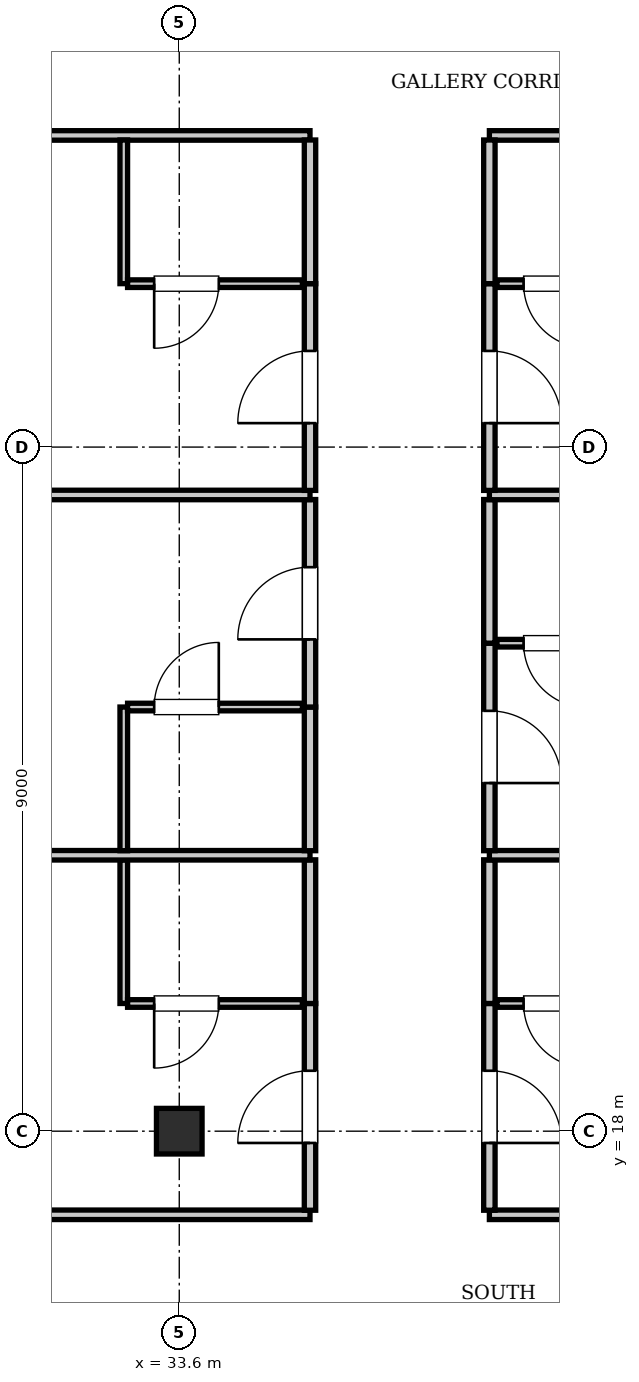
"""IFC4 building model, lengths in metres.
Left out: names, types, materials, properties, quantities, classifications, styles, units other than length and angle.
Written with IfcOpenShell. Run it as: python <this file> out.ifc"""

import sys

from ifc_helpers import new_model, si_unit, direction, frame, frame_2d, origin, origin_2d, place, context, subcontext, project, spatial, rectangle, i_section, extrude, element, fill, save


model = new_model("IFC4")
c1 = context("Model", 3, precision=1e-05, world=origin(), true_north=direction((0.0, 1.0)))
c2 = subcontext(c1, "Body", "Model", "MODEL_VIEW")
j1 = project(units=[si_unit("LENGTHUNIT", "METRE"), si_unit("PLANEANGLEUNIT", "RADIAN")], contexts=[c1])
p1 = place(None, origin())
s1 = spatial("IfcSite", under=j1, at=p1, CompositionType="ELEMENT")
p2 = place(p1, origin())
s2 = spatial("IfcBuilding", under=s1, at=p2, CompositionType="ELEMENT")
p3 = place(p2, frame((0.0, 0.0, 142.8)))
s3 = spatial("IfcBuildingStorey", under=s2, at=p3, CompositionType="ELEMENT", Elevation=142.8)
p4 = place(p3, frame((33.6, 18.0, 0.0), z_axis=(0.0, 0.0, 1.0), x_axis=(1.0, 0.0, 0.0)))
e1 = element("IfcColumn", 1, at=p4, inside=s3, PredefinedType="COLUMN", context=c2, shape_type="SweptSolid", body=[
    extrude(i_section(OverallWidth=0.6, OverallDepth=0.6, WebThickness=0.025, FlangeThickness=0.038, at=origin_2d()), origin(), (0.0, 0.0, 1.0), 3.85),
])
p5 = place(p3, frame((13.2, 16.9, 0.0), z_axis=(0.0, 0.0, 1.0), x_axis=(1.0, 0.0, 0.0)))
e2 = element("IfcWall", 2, at=p5, inside=s3, PredefinedType="PARTITIONING", context=c2, shape_type="SweptSolid", body=[
    extrude(rectangle(XDim=22.12, YDim=0.125, at=frame_2d((11.06, 0.0))), origin(), (0.0, 0.0, 1.0), 3.61),
])
p6 = place(p3, frame((37.68, 16.9, 0.0), z_axis=(0.0, 0.0, 1.0), x_axis=(1.0, 0.0, 0.0)))
e3 = element("IfcWall", 3, at=p6, inside=s3, PredefinedType="PARTITIONING", context=c2, shape_type="SweptSolid", body=[
    extrude(rectangle(XDim=24.72, YDim=0.125, at=frame_2d((12.36, 0.0))), origin(), (0.0, 0.0, 1.0), 3.61),
])
p7 = place(p3, frame((13.2, 31.1, 0.0), z_axis=(0.0, 0.0, 1.0), x_axis=(1.0, 0.0, 0.0)))
e4 = element("IfcWall", 4, at=p7, inside=s3, PredefinedType="PARTITIONING", context=c2, shape_type="SweptSolid", body=[
    extrude(rectangle(XDim=22.12, YDim=0.125, at=frame_2d((11.06, 0.0))), origin(), (0.0, 0.0, 1.0), 3.61),
])
p8 = place(p3, frame((37.68, 31.1, 0.0), z_axis=(0.0, 0.0, 1.0), x_axis=(1.0, 0.0, 0.0)))
e5 = element("IfcWall", 5, at=p8, inside=s3, PredefinedType="PARTITIONING", context=c2, shape_type="SweptSolid", body=[
    extrude(rectangle(XDim=24.72, YDim=0.125, at=frame_2d((12.36, 0.0))), origin(), (0.0, 0.0, 1.0), 3.61),
])
p9 = place(p3, frame((35.32, 16.96, 0.0), z_axis=(0.0, 0.0, 1.0), x_axis=(0.0, 1.0, 0.0)))
e6 = element("IfcWall", 6, at=p9, inside=s3, PredefinedType="PARTITIONING", context=c2, shape_type="SweptSolid", body=[
    extrude(rectangle(XDim=2.72, YDim=0.15, at=frame_2d((1.36, 0.0))), origin(), (0.0, 0.0, 1.0), 3.61),
])
p10 = place(p9, frame((0.885, 0.0, 0.0)))
e7 = element("IfcOpeningElement", 7, at=p10, cuts=e6, PredefinedType="OPENING", context=c2, shape_type="SweptSolid", body=[
    extrude(rectangle(XDim=0.95, YDim=2.15, at=frame_2d((0.475, 1.075))), frame((0.0, 0.085, 0.0), z_axis=(0.0, -1.0, 0.0), x_axis=(1.0, 0.0, 0.0)), (0.0, 0.0, 1.0), 0.17),
])
p11 = place(p3, frame((35.32, 19.68, 0.0), z_axis=(0.0, 0.0, 1.0), x_axis=(0.0, 1.0, 0.0)))
e8 = element("IfcWall", 8, at=p11, inside=s3, PredefinedType="PARTITIONING", context=c2, shape_type="SweptSolid", body=[
    extrude(rectangle(XDim=1.89, YDim=0.15, at=frame_2d((0.945, 0.0))), origin(), (0.0, 0.0, 1.0), 3.61),
])
p12 = place(p3, frame((32.87, 19.68, 0.0), z_axis=(0.0, 0.0, 1.0), x_axis=(0.0, 1.0, 0.0)))
e9 = element("IfcWall", 9, at=p12, inside=s3, PredefinedType="PARTITIONING", context=c2, shape_type="SweptSolid", body=[
    extrude(rectangle(XDim=1.89, YDim=0.1, at=frame_2d((0.945, 0.0))), origin(), (0.0, 0.0, 1.0), 3.61),
])
p13 = place(p3, frame((32.92, 19.68, 0.0), z_axis=(0.0, 0.0, 1.0), x_axis=(1.0, 0.0, 0.0)))
e10 = element("IfcWall", 10, at=p13, inside=s3, PredefinedType="PARTITIONING", context=c2, shape_type="SweptSolid", body=[
    extrude(rectangle(XDim=2.3, YDim=0.1, at=frame_2d((1.15, 0.0))), origin(), (0.0, 0.0, 1.0), 3.61),
])
p14 = place(p13, frame((0.35, 0.0, 0.0)))
e11 = element("IfcOpeningElement", 11, at=p14, cuts=e10, PredefinedType="OPENING", context=c2, shape_type="SweptSolid", body=[
    extrude(rectangle(XDim=0.85, YDim=2.1, at=frame_2d((0.425, 1.05))), frame((0.0, 0.06, 0.0), z_axis=(0.0, -1.0, 0.0), x_axis=(1.0, 0.0, 0.0)), (0.0, 0.0, 1.0), 0.12),
])
p15 = place(p3, frame((37.68, 16.96, 0.0), z_axis=(0.0, 0.0, 1.0), x_axis=(0.0, 1.0, 0.0)))
e12 = element("IfcWall", 12, at=p15, inside=s3, PredefinedType="PARTITIONING", context=c2, shape_type="SweptSolid", body=[
    extrude(rectangle(XDim=2.72, YDim=0.15, at=frame_2d((1.36, 0.0))), origin(), (0.0, 0.0, 1.0), 3.304),
])
p16 = place(p15, frame((0.885, 0.0, 0.0)))
e13 = element("IfcOpeningElement", 13, at=p16, cuts=e12, PredefinedType="OPENING", context=c2, shape_type="SweptSolid", body=[
    extrude(rectangle(XDim=0.95, YDim=2.15, at=frame_2d((0.475, 1.075))), frame((0.0, 0.085, 0.0), z_axis=(0.0, -1.0, 0.0), x_axis=(1.0, 0.0, 0.0)), (0.0, 0.0, 1.0), 0.17),
])
p17 = place(p3, frame((37.68, 19.68, 0.0), z_axis=(0.0, 0.0, 1.0), x_axis=(0.0, 1.0, 0.0)))
e14 = element("IfcWall", 14, at=p17, inside=s3, PredefinedType="PARTITIONING", context=c2, shape_type="SweptSolid", body=[
    extrude(rectangle(XDim=1.89, YDim=0.15, at=frame_2d((0.945, 0.0))), origin(), (0.0, 0.0, 1.0), 3.61),
])
p18 = place(p3, frame((37.78, 19.68, 0.0), z_axis=(0.0, 0.0, 1.0), x_axis=(1.0, 0.0, 0.0)))
e15 = element("IfcWall", 15, at=p18, inside=s3, PredefinedType="PARTITIONING", context=c2, shape_type="SweptSolid", body=[
    extrude(rectangle(XDim=2.3, YDim=0.1, at=frame_2d((1.15, 0.0))), origin(), (0.0, 0.0, 1.0), 3.61),
])
p19 = place(p18, frame((0.35, 0.0, 0.0)))
e16 = element("IfcOpeningElement", 16, at=p19, cuts=e15, PredefinedType="OPENING", context=c2, shape_type="SweptSolid", body=[
    extrude(rectangle(XDim=0.85, YDim=2.1, at=frame_2d((0.425, 1.05))), frame((0.0, 0.06, 0.0), z_axis=(0.0, -1.0, 0.0), x_axis=(1.0, 0.0, 0.0)), (0.0, 0.0, 1.0), 0.12),
])
p20 = place(p3, frame((13.2, 21.63, 0.0), z_axis=(0.0, 0.0, 1.0), x_axis=(1.0, 0.0, 0.0)))
e17 = element("IfcWall", 17, at=p20, inside=s3, PredefinedType="PARTITIONING", context=c2, shape_type="SweptSolid", body=[
    extrude(rectangle(XDim=22.12, YDim=0.125, at=frame_2d((11.06, 0.0))), origin(), (0.0, 0.0, 1.0), 3.61),
])
p21 = place(p3, frame((37.68, 21.63, 0.0), z_axis=(0.0, 0.0, 1.0), x_axis=(1.0, 0.0, 0.0)))
e18 = element("IfcWall", 18, at=p21, inside=s3, PredefinedType="PARTITIONING", context=c2, shape_type="SweptSolid", body=[
    extrude(rectangle(XDim=24.72, YDim=0.125, at=frame_2d((12.36, 0.0))), origin(), (0.0, 0.0, 1.0), 3.61),
])
p22 = place(p3, frame((35.32, 21.69, 0.0), z_axis=(0.0, 0.0, 1.0), x_axis=(0.0, 1.0, 0.0)))
e19 = element("IfcWall", 19, at=p22, inside=s3, PredefinedType="PARTITIONING", context=c2, shape_type="SweptSolid", body=[
    extrude(rectangle(XDim=1.89, YDim=0.15, at=frame_2d((0.945, 0.0))), origin(), (0.0, 0.0, 1.0), 3.61),
])
p23 = place(p3, frame((35.32, 23.58, 0.0), z_axis=(0.0, 0.0, 1.0), x_axis=(0.0, 1.0, 0.0)))
e20 = element("IfcWall", 20, at=p23, inside=s3, PredefinedType="PARTITIONING", context=c2, shape_type="SweptSolid", body=[
    extrude(rectangle(XDim=2.73, YDim=0.15, at=frame_2d((1.365, 0.0))), origin(), (0.0, 0.0, 1.0), 3.61),
])
p24 = place(p23, frame((0.89, 0.0, 0.0)))
e21 = element("IfcOpeningElement", 21, at=p24, cuts=e20, PredefinedType="OPENING", context=c2, shape_type="SweptSolid", body=[
    extrude(rectangle(XDim=0.95, YDim=2.15, at=frame_2d((0.475, 1.075))), frame((0.0, 0.085, 0.0), z_axis=(0.0, -1.0, 0.0), x_axis=(1.0, 0.0, 0.0)), (0.0, 0.0, 1.0), 0.17),
])
p25 = place(p3, frame((32.87, 21.69, 0.0), z_axis=(0.0, 0.0, 1.0), x_axis=(0.0, 1.0, 0.0)))
e22 = element("IfcWall", 22, at=p25, inside=s3, PredefinedType="PARTITIONING", context=c2, shape_type="SweptSolid", body=[
    extrude(rectangle(XDim=1.89, YDim=0.1, at=frame_2d((0.945, 0.0))), origin(), (0.0, 0.0, 1.0), 3.61),
])
p26 = place(p3, frame((32.92, 23.58, 0.0), z_axis=(0.0, 0.0, 1.0), x_axis=(1.0, 0.0, 0.0)))
e23 = element("IfcWall", 23, at=p26, inside=s3, PredefinedType="PARTITIONING", context=c2, shape_type="SweptSolid", body=[
    extrude(rectangle(XDim=2.3, YDim=0.1, at=frame_2d((1.15, 0.0))), origin(), (0.0, 0.0, 1.0), 3.61),
])
p27 = place(p26, frame((0.35, 0.0, 0.0)))
e24 = element("IfcOpeningElement", 24, at=p27, cuts=e23, PredefinedType="OPENING", context=c2, shape_type="SweptSolid", body=[
    extrude(rectangle(XDim=0.85, YDim=2.1, at=frame_2d((0.425, 1.05))), frame((0.0, 0.06, 0.0), z_axis=(0.0, -1.0, 0.0), x_axis=(1.0, 0.0, 0.0)), (0.0, 0.0, 1.0), 0.12),
])
p28 = place(p3, frame((37.68, 21.69, 0.0), z_axis=(0.0, 0.0, 1.0), x_axis=(0.0, 1.0, 0.0)))
e25 = element("IfcWall", 25, at=p28, inside=s3, PredefinedType="PARTITIONING", context=c2, shape_type="SweptSolid", body=[
    extrude(rectangle(XDim=2.73, YDim=0.15, at=frame_2d((1.365, 0.0))), origin(), (0.0, 0.0, 1.0), 3.61),
])
p29 = place(p28, frame((0.89, 0.0, 0.0)))
e26 = element("IfcOpeningElement", 26, at=p29, cuts=e25, PredefinedType="OPENING", context=c2, shape_type="SweptSolid", body=[
    extrude(rectangle(XDim=0.95, YDim=2.15, at=frame_2d((0.475, 1.075))), frame((0.0, 0.085, 0.0), z_axis=(0.0, -1.0, 0.0), x_axis=(1.0, 0.0, 0.0)), (0.0, 0.0, 1.0), 0.17),
])
p30 = place(p3, frame((37.68, 24.42, 0.0), z_axis=(0.0, 0.0, 1.0), x_axis=(0.0, 1.0, 0.0)))
e27 = element("IfcWall", 27, at=p30, inside=s3, PredefinedType="PARTITIONING", context=c2, shape_type="SweptSolid", body=[
    extrude(rectangle(XDim=1.89, YDim=0.15, at=frame_2d((0.945, 0.0))), origin(), (0.0, 0.0, 1.0), 3.61),
])
p31 = place(p3, frame((37.78, 24.42, 0.0), z_axis=(0.0, 0.0, 1.0), x_axis=(1.0, 0.0, 0.0)))
e28 = element("IfcWall", 28, at=p31, inside=s3, PredefinedType="PARTITIONING", context=c2, shape_type="SweptSolid", body=[
    extrude(rectangle(XDim=2.3, YDim=0.1, at=frame_2d((1.15, 0.0))), origin(), (0.0, 0.0, 1.0), 3.61),
])
p32 = place(p31, frame((0.35, 0.0, 0.0)))
e29 = element("IfcOpeningElement", 29, at=p32, cuts=e28, PredefinedType="OPENING", context=c2, shape_type="SweptSolid", body=[
    extrude(rectangle(XDim=0.85, YDim=2.1, at=frame_2d((0.425, 1.05))), frame((0.0, 0.06, 0.0), z_axis=(0.0, -1.0, 0.0), x_axis=(1.0, 0.0, 0.0)), (0.0, 0.0, 1.0), 0.12),
])
p33 = place(p3, frame((13.2, 26.37, 0.0), z_axis=(0.0, 0.0, 1.0), x_axis=(1.0, 0.0, 0.0)))
e30 = element("IfcWall", 30, at=p33, inside=s3, PredefinedType="PARTITIONING", context=c2, shape_type="SweptSolid", body=[
    extrude(rectangle(XDim=22.12, YDim=0.125, at=frame_2d((11.06, 0.0))), origin(), (0.0, 0.0, 1.0), 3.61),
])
p34 = place(p3, frame((37.68, 26.37, 0.0), z_axis=(0.0, 0.0, 1.0), x_axis=(1.0, 0.0, 0.0)))
e31 = element("IfcWall", 31, at=p34, inside=s3, PredefinedType="PARTITIONING", context=c2, shape_type="SweptSolid", body=[
    extrude(rectangle(XDim=24.72, YDim=0.125, at=frame_2d((12.36, 0.0))), origin(), (0.0, 0.0, 1.0), 3.61),
])
p35 = place(p3, frame((35.32, 26.43, 0.0), z_axis=(0.0, 0.0, 1.0), x_axis=(0.0, 1.0, 0.0)))
e32 = element("IfcWall", 32, at=p35, inside=s3, PredefinedType="PARTITIONING", context=c2, shape_type="SweptSolid", body=[
    extrude(rectangle(XDim=2.72, YDim=0.15, at=frame_2d((1.36, 0.0))), origin(), (0.0, 0.0, 1.0), 3.61),
])
p36 = place(p35, frame((0.885, 0.0, 0.0)))
e33 = element("IfcOpeningElement", 33, at=p36, cuts=e32, PredefinedType="OPENING", context=c2, shape_type="SweptSolid", body=[
    extrude(rectangle(XDim=0.95, YDim=2.15, at=frame_2d((0.475, 1.075))), frame((0.0, 0.085, 0.0), z_axis=(0.0, -1.0, 0.0), x_axis=(1.0, 0.0, 0.0)), (0.0, 0.0, 1.0), 0.17),
])
p37 = place(p3, frame((35.32, 29.15, 0.0), z_axis=(0.0, 0.0, 1.0), x_axis=(0.0, 1.0, 0.0)))
e34 = element("IfcWall", 34, at=p37, inside=s3, PredefinedType="PARTITIONING", context=c2, shape_type="SweptSolid", body=[
    extrude(rectangle(XDim=1.89, YDim=0.15, at=frame_2d((0.945, 0.0))), origin(), (0.0, 0.0, 1.0), 3.61),
])
p38 = place(p3, frame((32.87, 29.15, 0.0), z_axis=(0.0, 0.0, 1.0), x_axis=(0.0, 1.0, 0.0)))
e35 = element("IfcWall", 35, at=p38, inside=s3, PredefinedType="PARTITIONING", context=c2, shape_type="SweptSolid", body=[
    extrude(rectangle(XDim=1.89, YDim=0.1, at=frame_2d((0.945, 0.0))), origin(), (0.0, 0.0, 1.0), 3.61),
])
p39 = place(p3, frame((32.92, 29.15, 0.0), z_axis=(0.0, 0.0, 1.0), x_axis=(1.0, 0.0, 0.0)))
e36 = element("IfcWall", 36, at=p39, inside=s3, PredefinedType="PARTITIONING", context=c2, shape_type="SweptSolid", body=[
    extrude(rectangle(XDim=2.3, YDim=0.1, at=frame_2d((1.15, 0.0))), origin(), (0.0, 0.0, 1.0), 3.61),
])
p40 = place(p39, frame((0.35, 0.0, 0.0)))
e37 = element("IfcOpeningElement", 37, at=p40, cuts=e36, PredefinedType="OPENING", context=c2, shape_type="SweptSolid", body=[
    extrude(rectangle(XDim=0.85, YDim=2.1, at=frame_2d((0.425, 1.05))), frame((0.0, 0.06, 0.0), z_axis=(0.0, -1.0, 0.0), x_axis=(1.0, 0.0, 0.0)), (0.0, 0.0, 1.0), 0.12),
])
p41 = place(p3, frame((37.68, 26.43, 0.0), z_axis=(0.0, 0.0, 1.0), x_axis=(0.0, 1.0, 0.0)))
e38 = element("IfcWall", 38, at=p41, inside=s3, PredefinedType="PARTITIONING", context=c2, shape_type="SweptSolid", body=[
    extrude(rectangle(XDim=2.72, YDim=0.15, at=frame_2d((1.36, 0.0))), origin(), (0.0, 0.0, 1.0), 3.61),
])
p42 = place(p41, frame((0.885, 0.0, 0.0)))
e39 = element("IfcOpeningElement", 39, at=p42, cuts=e38, PredefinedType="OPENING", context=c2, shape_type="SweptSolid", body=[
    extrude(rectangle(XDim=0.95, YDim=2.15, at=frame_2d((0.475, 1.075))), frame((0.0, 0.085, 0.0), z_axis=(0.0, -1.0, 0.0), x_axis=(1.0, 0.0, 0.0)), (0.0, 0.0, 1.0), 0.17),
])
p43 = place(p3, frame((37.68, 29.15, 0.0), z_axis=(0.0, 0.0, 1.0), x_axis=(0.0, 1.0, 0.0)))
e40 = element("IfcWall", 40, at=p43, inside=s3, PredefinedType="PARTITIONING", context=c2, shape_type="SweptSolid", body=[
    extrude(rectangle(XDim=1.89, YDim=0.15, at=frame_2d((0.945, 0.0))), origin(), (0.0, 0.0, 1.0), 3.61),
])
p44 = place(p3, frame((37.78, 29.15, 0.0), z_axis=(0.0, 0.0, 1.0), x_axis=(1.0, 0.0, 0.0)))
e41 = element("IfcWall", 41, at=p44, inside=s3, PredefinedType="PARTITIONING", context=c2, shape_type="SweptSolid", body=[
    extrude(rectangle(XDim=2.3, YDim=0.1, at=frame_2d((1.15, 0.0))), origin(), (0.0, 0.0, 1.0), 3.61),
])
p45 = place(p44, frame((0.35, 0.0, 0.0)))
e42 = element("IfcOpeningElement", 42, at=p45, cuts=e41, PredefinedType="OPENING", context=c2, shape_type="SweptSolid", body=[
    extrude(rectangle(XDim=0.85, YDim=2.1, at=frame_2d((0.425, 1.05))), frame((0.0, 0.06, 0.0), z_axis=(0.0, -1.0, 0.0), x_axis=(1.0, 0.0, 0.0)), (0.0, 0.0, 1.0), 0.12),
])
p46 = place(p14, frame((0.85, 0.0, 0.0), z_axis=(0.0, 0.0, 1.0), x_axis=(-1.0, 0.0, 0.0)))
e43 = element("IfcDoor", 43, at=p46, inside=s3, OperationType="SINGLE_SWING_RIGHT", PredefinedType="DOOR", context=c2, shape_type="SweptSolid", body=[
    extrude(rectangle(XDim=0.85, YDim=2.1, at=frame_2d((0.425, 1.05))), frame((0.0, 0.025, 0.0), z_axis=(0.0, -1.0, 0.0), x_axis=(1.0, 0.0, 0.0)), (0.0, 0.0, 1.0), 0.05),
])
fill(e11, e43)
p47 = place(p10, origin())
e44 = element("IfcDoor", 44, at=p47, inside=s3, OperationType="SINGLE_SWING_LEFT", PredefinedType="DOOR", context=c2, shape_type="SweptSolid", body=[
    extrude(rectangle(XDim=0.95, YDim=2.15, at=frame_2d((0.475, 1.075))), frame((0.0, 0.025, 0.0), z_axis=(0.0, -1.0, 0.0), x_axis=(1.0, 0.0, 0.0)), (0.0, 0.0, 1.0), 0.05),
])
fill(e7, e44)
p48 = place(p19, frame((0.85, 0.0, 0.0), z_axis=(0.0, 0.0, 1.0), x_axis=(-1.0, 0.0, 0.0)))
e45 = element("IfcDoor", 45, at=p48, inside=s3, OperationType="SINGLE_SWING_LEFT", PredefinedType="DOOR", context=c2, shape_type="SweptSolid", body=[
    extrude(rectangle(XDim=0.85, YDim=2.1, at=frame_2d((0.425, 1.05))), frame((0.0, 0.025, 0.0), z_axis=(0.0, -1.0, 0.0), x_axis=(1.0, 0.0, 0.0)), (0.0, 0.0, 1.0), 0.05),
])
fill(e16, e45)
p49 = place(p16, frame((0.95, 0.0, 0.0), z_axis=(0.0, 0.0, 1.0), x_axis=(-1.0, 0.0, 0.0)))
e46 = element("IfcDoor", 46, at=p49, inside=s3, OperationType="SINGLE_SWING_RIGHT", PredefinedType="DOOR", context=c2, shape_type="SweptSolid", body=[
    extrude(rectangle(XDim=0.95, YDim=2.15, at=frame_2d((0.475, 1.075))), frame((0.0, 0.025, 0.0), z_axis=(0.0, -1.0, 0.0), x_axis=(1.0, 0.0, 0.0)), (0.0, 0.0, 1.0), 0.05),
])
fill(e13, e46)
p50 = place(p27, origin())
e47 = element("IfcDoor", 47, at=p50, inside=s3, OperationType="SINGLE_SWING_RIGHT", PredefinedType="DOOR", context=c2, shape_type="SweptSolid", body=[
    extrude(rectangle(XDim=0.85, YDim=2.1, at=frame_2d((0.425, 1.05))), frame((0.0, 0.025, 0.0), z_axis=(0.0, -1.0, 0.0), x_axis=(1.0, 0.0, 0.0)), (0.0, 0.0, 1.0), 0.05),
])
fill(e24, e47)
p51 = place(p24, origin())
e48 = element("IfcDoor", 48, at=p51, inside=s3, OperationType="SINGLE_SWING_LEFT", PredefinedType="DOOR", context=c2, shape_type="SweptSolid", body=[
    extrude(rectangle(XDim=0.95, YDim=2.15, at=frame_2d((0.475, 1.075))), frame((0.0, 0.025, 0.0), z_axis=(0.0, -1.0, 0.0), x_axis=(1.0, 0.0, 0.0)), (0.0, 0.0, 1.0), 0.05),
])
fill(e21, e48)
p52 = place(p32, frame((0.85, 0.0, 0.0), z_axis=(0.0, 0.0, 1.0), x_axis=(-1.0, 0.0, 0.0)))
e49 = element("IfcDoor", 49, at=p52, inside=s3, OperationType="SINGLE_SWING_LEFT", PredefinedType="DOOR", context=c2, shape_type="SweptSolid", body=[
    extrude(rectangle(XDim=0.85, YDim=2.1, at=frame_2d((0.425, 1.05))), frame((0.0, 0.025, 0.0), z_axis=(0.0, -1.0, 0.0), x_axis=(1.0, 0.0, 0.0)), (0.0, 0.0, 1.0), 0.05),
])
fill(e29, e49)
p53 = place(p29, frame((0.95, 0.0, 0.0), z_axis=(0.0, 0.0, 1.0), x_axis=(-1.0, 0.0, 0.0)))
e50 = element("IfcDoor", 50, at=p53, inside=s3, OperationType="SINGLE_SWING_RIGHT", PredefinedType="DOOR", context=c2, shape_type="SweptSolid", body=[
    extrude(rectangle(XDim=0.95, YDim=2.15, at=frame_2d((0.475, 1.075))), frame((0.0, 0.025, 0.0), z_axis=(0.0, -1.0, 0.0), x_axis=(1.0, 0.0, 0.0)), (0.0, 0.0, 1.0), 0.05),
])
fill(e26, e50)
p54 = place(p40, frame((0.85, 0.0, 0.0), z_axis=(0.0, 0.0, 1.0), x_axis=(-1.0, 0.0, 0.0)))
e51 = element("IfcDoor", 51, at=p54, inside=s3, OperationType="SINGLE_SWING_RIGHT", PredefinedType="DOOR", context=c2, shape_type="SweptSolid", body=[
    extrude(rectangle(XDim=0.85, YDim=2.1, at=frame_2d((0.425, 1.05))), frame((0.0, 0.025, 0.0), z_axis=(0.0, -1.0, 0.0), x_axis=(1.0, 0.0, 0.0)), (0.0, 0.0, 1.0), 0.05),
])
fill(e37, e51)
p55 = place(p36, origin())
e52 = element("IfcDoor", 52, at=p55, inside=s3, OperationType="SINGLE_SWING_LEFT", PredefinedType="DOOR", context=c2, shape_type="SweptSolid", body=[
    extrude(rectangle(XDim=0.95, YDim=2.15, at=frame_2d((0.475, 1.075))), frame((0.0, 0.025, 0.0), z_axis=(0.0, -1.0, 0.0), x_axis=(1.0, 0.0, 0.0)), (0.0, 0.0, 1.0), 0.05),
])
fill(e33, e52)
p56 = place(p45, frame((0.85, 0.0, 0.0), z_axis=(0.0, 0.0, 1.0), x_axis=(-1.0, 0.0, 0.0)))
e53 = element("IfcDoor", 53, at=p56, inside=s3, OperationType="SINGLE_SWING_LEFT", PredefinedType="DOOR", context=c2, shape_type="SweptSolid", body=[
    extrude(rectangle(XDim=0.85, YDim=2.1, at=frame_2d((0.425, 1.05))), frame((0.0, 0.025, 0.0), z_axis=(0.0, -1.0, 0.0), x_axis=(1.0, 0.0, 0.0)), (0.0, 0.0, 1.0), 0.05),
])
fill(e42, e53)
p57 = place(p42, frame((0.95, 0.0, 0.0), z_axis=(0.0, 0.0, 1.0), x_axis=(-1.0, 0.0, 0.0)))
e54 = element("IfcDoor", 54, at=p57, inside=s3, OperationType="SINGLE_SWING_RIGHT", PredefinedType="DOOR", context=c2, shape_type="SweptSolid", body=[
    extrude(rectangle(XDim=0.95, YDim=2.15, at=frame_2d((0.475, 1.075))), frame((0.0, 0.025, 0.0), z_axis=(0.0, -1.0, 0.0), x_axis=(1.0, 0.0, 0.0)), (0.0, 0.0, 1.0), 0.05),
])
fill(e39, e54)
save(model, sys.argv[1])
